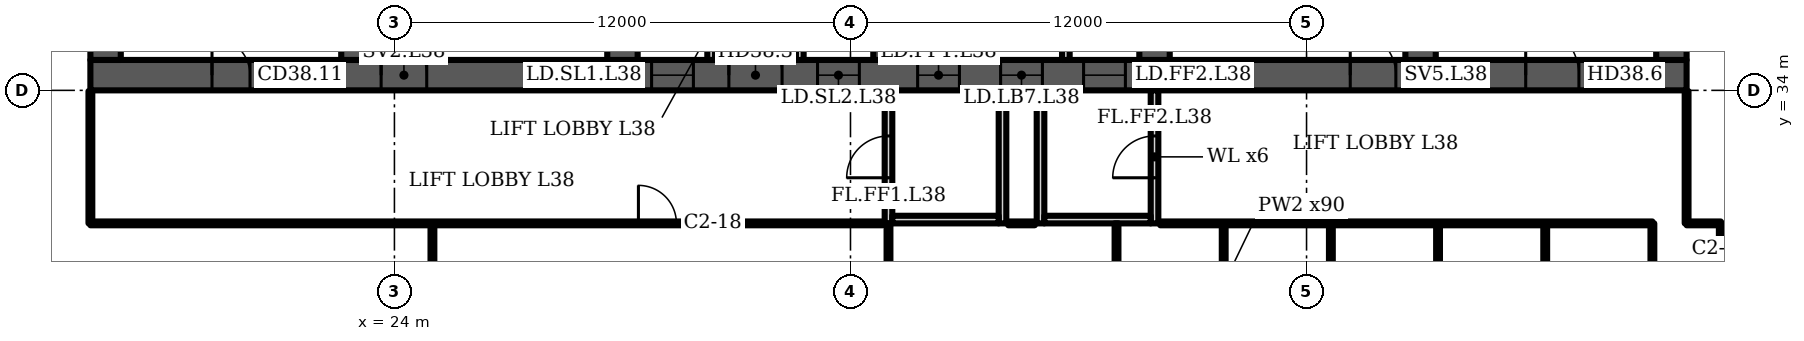
"""IFC4 building model, lengths in metres.
Left out: names, types, materials, properties, quantities, classifications, styles, units other than length and angle.
Written with IfcOpenShell. Run it as: python <this file> out.ifc"""

import sys

from ifc_helpers import new_model, si_unit, direction, frame, frame_2d, origin, place, context, subcontext, project, spatial, polyline, rectangle, outline, extrude, element, fill, save


model = new_model("IFC4")
c1 = context("Model", 3, precision=1e-05, world=origin(), true_north=direction((0.0, 1.0)))
c2 = subcontext(c1, "Body", "Model", "MODEL_VIEW")
j1 = project(units=[si_unit("LENGTHUNIT", "METRE"), si_unit("PLANEANGLEUNIT", "RADIAN")], contexts=[c1])
p1 = place(None, origin())
s1 = spatial("IfcSite", under=j1, at=p1, CompositionType="ELEMENT")
p2 = place(p1, origin())
s2 = spatial("IfcBuilding", under=s1, at=p2, CompositionType="ELEMENT")
p3 = place(p2, frame((0.0, 0.0, 159.1)))
s3 = spatial("IfcBuildingStorey", under=s2, at=p3, CompositionType="ELEMENT", Elevation=159.1)
p4 = place(p3, frame((16.0, 34.4, 0.0), z_axis=(0.0, 0.0, 1.0), x_axis=(1.0, 0.0, 0.0)))
e1 = element("IfcWall", 1, at=p4, inside=s3, PredefinedType="SHEAR", context=c2, shape_type="SweptSolid", body=[
    extrude(rectangle(XDim=42.0, YDim=0.8, at=frame_2d((21.0, 0.0))), origin(), (0.0, 0.0, 1.0), 3.6),
])
p5 = place(p4, frame((3.2, 0.0, 0.0)))
e2 = element("IfcOpeningElement", 2, at=p5, cuts=e1, PredefinedType="OPENING", context=c2, shape_type="SweptSolid", body=[
    extrude(rectangle(XDim=1.0, YDim=2.1, at=frame_2d((0.5, 1.05))), frame((0.0, 0.41, 0.0), z_axis=(0.0, -1.0, 0.0), x_axis=(1.0, 0.0, 0.0)), (0.0, 0.0, 1.0), 0.82),
])
p6 = place(p4, frame((7.65, 0.0, 0.0)))
e3 = element("IfcOpeningElement", 3, at=p6, cuts=e1, PredefinedType="OPENING", context=c2, shape_type="SweptSolid", body=[
    extrude(rectangle(XDim=1.2, YDim=2.1, at=frame_2d((0.6, 1.05))), frame((0.0, 0.41, 0.0), z_axis=(0.0, -1.0, 0.0), x_axis=(1.0, 0.0, 0.0)), (0.0, 0.0, 1.0), 0.82),
])
p7 = place(p4, frame((14.767, 0.0, 0.0)))
e4 = element("IfcOpeningElement", 4, at=p7, cuts=e1, PredefinedType="OPENING", context=c2, shape_type="SweptSolid", body=[
    extrude(rectangle(XDim=1.1, YDim=2.1, at=frame_2d((0.55, 1.05))), frame((0.0, 0.41, 0.0), z_axis=(0.0, -1.0, 0.0), x_axis=(1.0, 0.0, 0.0)), (0.0, 0.0, 1.0), 0.82),
])
p8 = place(p4, frame((19.133, 0.0, 0.0)))
e5 = element("IfcOpeningElement", 5, at=p8, cuts=e1, PredefinedType="OPENING", context=c2, shape_type="SweptSolid", body=[
    extrude(rectangle(XDim=1.1, YDim=2.1, at=frame_2d((0.55, 1.05))), frame((0.0, 0.41, 0.0), z_axis=(0.0, -1.0, 0.0), x_axis=(1.0, 0.0, 0.0)), (0.0, 0.0, 1.0), 0.82),
])
p9 = place(p4, frame((16.8, 0.0, 0.0)))
e6 = element("IfcOpeningElement", 6, at=p9, cuts=e1, PredefinedType="OPENING", context=c2, shape_type="SweptSolid", body=[
    extrude(rectangle(XDim=1.4, YDim=2.1, at=frame_2d((0.7, 1.05))), frame((0.0, 0.41, 0.0), z_axis=(0.0, -1.0, 0.0), x_axis=(1.0, 0.0, 0.0)), (0.0, 0.0, 1.0), 0.82),
])
p10 = place(p4, frame((21.767, 0.0, 0.0)))
e7 = element("IfcOpeningElement", 7, at=p10, cuts=e1, PredefinedType="OPENING", context=c2, shape_type="SweptSolid", body=[
    extrude(rectangle(XDim=1.1, YDim=2.1, at=frame_2d((0.55, 1.05))), frame((0.0, 0.41, 0.0), z_axis=(0.0, -1.0, 0.0), x_axis=(1.0, 0.0, 0.0)), (0.0, 0.0, 1.0), 0.82),
])
p11 = place(p4, frame((23.95, 0.0, 0.0)))
e8 = element("IfcOpeningElement", 8, at=p11, cuts=e1, PredefinedType="OPENING", context=c2, shape_type="SweptSolid", body=[
    extrude(rectangle(XDim=1.1, YDim=2.1, at=frame_2d((0.55, 1.05))), frame((0.0, 0.41, 0.0), z_axis=(0.0, -1.0, 0.0), x_axis=(1.0, 0.0, 0.0)), (0.0, 0.0, 1.0), 0.82),
])
p12 = place(p4, frame((26.133, 0.0, 0.0)))
e9 = element("IfcOpeningElement", 9, at=p12, cuts=e1, PredefinedType="OPENING", context=c2, shape_type="SweptSolid", body=[
    extrude(rectangle(XDim=1.1, YDim=2.1, at=frame_2d((0.55, 1.05))), frame((0.0, 0.41, 0.0), z_axis=(0.0, -1.0, 0.0), x_axis=(1.0, 0.0, 0.0)), (0.0, 0.0, 1.0), 0.82),
])
p13 = place(p4, frame((33.15, 0.0, 0.0)))
e10 = element("IfcOpeningElement", 10, at=p13, cuts=e1, PredefinedType="OPENING", context=c2, shape_type="SweptSolid", body=[
    extrude(rectangle(XDim=1.2, YDim=2.1, at=frame_2d((0.6, 1.05))), frame((0.0, 0.41, 0.0), z_axis=(0.0, -1.0, 0.0), x_axis=(1.0, 0.0, 0.0)), (0.0, 0.0, 1.0), 0.82),
])
p14 = place(p4, frame((37.767, 0.0, 0.0)))
e11 = element("IfcOpeningElement", 11, at=p14, cuts=e1, PredefinedType="OPENING", context=c2, shape_type="SweptSolid", body=[
    extrude(rectangle(XDim=1.4, YDim=2.1, at=frame_2d((0.7, 1.05))), frame((0.0, 0.41, 0.0), z_axis=(0.0, -1.0, 0.0), x_axis=(1.0, 0.0, 0.0)), (0.0, 0.0, 1.0), 0.82),
])
p15 = place(p3, frame((16.4, 34.8, 0.0), z_axis=(0.0, 0.0, 1.0), x_axis=(0.0, 1.0, 0.0)))
e12 = element("IfcWall", 12, at=p15, inside=s3, PredefinedType="SHEAR", context=c2, shape_type="SweptSolid", body=[
    extrude(rectangle(XDim=13.184, YDim=0.8, at=frame_2d((6.592, 0.0))), origin(), (0.0, 0.0, 1.0), 3.6),
])
p16 = place(p3, frame((23.0, 34.8, 0.0), z_axis=(0.0, 0.0, 1.0), x_axis=(0.0, 1.0, 0.0)))
e13 = element("IfcWall", 13, at=p16, inside=s3, PredefinedType="SHEAR", context=c2, shape_type="SweptSolid", body=[
    extrude(rectangle(XDim=13.762, YDim=0.8, at=frame_2d((6.881, 0.0))), origin(), (0.0, 0.0, 1.0), 3.6),
])
p17 = place(p16, frame((2.55, 0.0, 0.0)))
e14 = element("IfcOpeningElement", 14, at=p17, cuts=e13, PredefinedType="OPENING", context=c2, shape_type="SweptSolid", body=[
    extrude(rectangle(XDim=1.1, YDim=2.1, at=frame_2d((0.55, 1.05))), frame((0.0, 0.41, 0.0), z_axis=(0.0, -1.0, 0.0), x_axis=(1.0, 0.0, 0.0)), (0.0, 0.0, 1.0), 0.82),
])
p18 = place(p16, frame((10.0, 0.0, 0.0)))
e15 = element("IfcOpeningElement", 15, at=p18, cuts=e13, PredefinedType="OPENING", context=c2, shape_type="SweptSolid", body=[
    extrude(rectangle(XDim=1.0, YDim=2.1, at=frame_2d((0.5, 1.05))), frame((0.0, 0.41, 0.0), z_axis=(0.0, -1.0, 0.0), x_axis=(1.0, 0.0, 0.0)), (0.0, 0.0, 1.0), 0.82),
])
p19 = place(p3, frame((30.0, 34.8, 0.0), z_axis=(0.0, 0.0, 1.0), x_axis=(0.0, 1.0, 0.0)))
e16 = element("IfcWall", 16, at=p19, inside=s3, PredefinedType="SHEAR", context=c2, shape_type="SweptSolid", body=[
    extrude(rectangle(XDim=14.374, YDim=0.8, at=frame_2d((7.187, 0.0))), origin(), (0.0, 0.0, 1.0), 3.6),
])
p20 = place(p19, frame((3.6, 0.0, 0.0)))
e17 = element("IfcOpeningElement", 17, at=p20, cuts=e16, PredefinedType="OPENING", context=c2, shape_type="SweptSolid", body=[
    extrude(rectangle(XDim=1.1, YDim=2.1, at=frame_2d((0.55, 1.05))), frame((0.0, 0.41, 0.0), z_axis=(0.0, -1.0, 0.0), x_axis=(1.0, 0.0, 0.0)), (0.0, 0.0, 1.0), 0.82),
])
p21 = place(p3, frame((37.0, 34.8, 0.0), z_axis=(0.0, 0.0, 1.0), x_axis=(0.0, 1.0, 0.0)))
e18 = element("IfcWall", 18, at=p21, inside=s3, PredefinedType="SHEAR", context=c2, shape_type="SweptSolid", body=[
    extrude(rectangle(XDim=14.987, YDim=0.8, at=frame_2d((7.493, 0.0))), origin(), (0.0, 0.0, 1.0), 3.6),
])
p22 = place(p21, frame((11.312, 0.0, 0.0)))
e19 = element("IfcOpeningElement", 19, at=p22, cuts=e18, PredefinedType="OPENING", context=c2, shape_type="SweptSolid", body=[
    extrude(rectangle(XDim=1.0, YDim=2.1, at=frame_2d((0.5, 1.05))), frame((0.0, 0.41, 0.0), z_axis=(0.0, -1.0, 0.0), x_axis=(1.0, 0.0, 0.0)), (0.0, 0.0, 1.0), 0.82),
])
p23 = place(p21, frame((3.6, 0.0, 0.0)))
e20 = element("IfcOpeningElement", 20, at=p23, cuts=e18, PredefinedType="OPENING", context=c2, shape_type="SweptSolid", body=[
    extrude(rectangle(XDim=1.1, YDim=2.1, at=frame_2d((0.55, 1.05))), frame((0.0, 0.41, 0.0), z_axis=(0.0, -1.0, 0.0), x_axis=(1.0, 0.0, 0.0)), (0.0, 0.0, 1.0), 0.82),
])
p24 = place(p3, frame((44.0, 34.8, 0.0), z_axis=(0.0, 0.0, 1.0), x_axis=(0.0, 1.0, 0.0)))
e21 = element("IfcWall", 21, at=p24, inside=s3, PredefinedType="SHEAR", context=c2, shape_type="SweptSolid", body=[
    extrude(rectangle(XDim=14.374, YDim=0.8, at=frame_2d((7.187, 0.0))), origin(), (0.0, 0.0, 1.0), 3.6),
])
p25 = place(p24, frame((11.312, 0.0, 0.0)))
e22 = element("IfcOpeningElement", 22, at=p25, cuts=e21, PredefinedType="OPENING", context=c2, shape_type="SweptSolid", body=[
    extrude(rectangle(XDim=1.0, YDim=2.1, at=frame_2d((0.5, 1.05))), frame((0.0, 0.41, 0.0), z_axis=(0.0, -1.0, 0.0), x_axis=(1.0, 0.0, 0.0)), (0.0, 0.0, 1.0), 0.82),
])
p26 = place(p24, frame((3.6, 0.0, 0.0)))
e23 = element("IfcOpeningElement", 23, at=p26, cuts=e21, PredefinedType="OPENING", context=c2, shape_type="SweptSolid", body=[
    extrude(rectangle(XDim=1.1, YDim=2.1, at=frame_2d((0.55, 1.05))), frame((0.0, 0.41, 0.0), z_axis=(0.0, -1.0, 0.0), x_axis=(1.0, 0.0, 0.0)), (0.0, 0.0, 1.0), 0.82),
])
p27 = place(p3, frame((51.0, 34.8, 0.0), z_axis=(0.0, 0.0, 1.0), x_axis=(0.0, 1.0, 0.0)))
e24 = element("IfcWall", 24, at=p27, inside=s3, PredefinedType="SHEAR", context=c2, shape_type="SweptSolid", body=[
    extrude(rectangle(XDim=13.762, YDim=0.8, at=frame_2d((6.881, 0.0))), origin(), (0.0, 0.0, 1.0), 3.6),
])
p28 = place(p27, frame((3.6, 0.0, 0.0)))
e25 = element("IfcOpeningElement", 25, at=p28, cuts=e24, PredefinedType="OPENING", context=c2, shape_type="SweptSolid", body=[
    extrude(rectangle(XDim=1.1, YDim=2.1, at=frame_2d((0.55, 1.05))), frame((0.0, 0.41, 0.0), z_axis=(0.0, -1.0, 0.0), x_axis=(1.0, 0.0, 0.0)), (0.0, 0.0, 1.0), 0.82),
])
p29 = place(p3, frame((57.6, 34.8, 0.0), z_axis=(0.0, 0.0, 1.0), x_axis=(0.0, 1.0, 0.0)))
e26 = element("IfcWall", 26, at=p29, inside=s3, PredefinedType="SHEAR", context=c2, shape_type="SweptSolid", body=[
    extrude(rectangle(XDim=13.184, YDim=0.8, at=frame_2d((6.592, 0.0))), origin(), (0.0, 0.0, 1.0), 3.6),
])
p30 = place(p3, frame((0.0, 0.0, -0.0)))
e27 = element("IfcWall", 27, at=p30, inside=s3, PredefinedType="PARTITIONING", context=c2, shape_type="SweptSolid", body=[
    extrude(outline(polyline([(32.233, 37.65), (30.4, 37.65), (30.4, 37.85), (32.233, 37.85), (32.433, 37.85), (32.433, 34.8), (32.233, 34.8), (32.233, 37.65)])), origin(), (0.0, 0.0, 1.0), 3.2),
])
p31 = place(p3, frame((0.0, 0.0, -0.0)))
e28 = element("IfcWall", 28, at=p31, inside=s3, PredefinedType="PARTITIONING", context=c2, shape_type="SweptSolid", body=[
    extrude(outline(polyline([(34.567, 37.85), (34.767, 37.85), (36.6, 37.85), (36.6, 37.65), (34.767, 37.65), (34.767, 34.8), (34.567, 34.8), (34.567, 37.85)])), origin(), (0.0, 0.0, 1.0), 3.2),
])
p32 = place(p3, frame((0.0, 0.0, -0.0)))
e29 = element("IfcWall", 29, at=p32, inside=s3, PredefinedType="PARTITIONING", context=c2, shape_type="SweptSolid", body=[
    extrude(outline(polyline([(41.567, 37.1), (39.433, 37.1), (39.433, 34.8), (39.233, 34.8), (39.233, 37.65), (37.4, 37.65), (37.4, 37.85), (39.233, 37.85), (39.433, 37.85), (39.433, 37.3), (41.567, 37.3), (41.567, 37.55), (41.767, 37.55), (43.6, 37.55), (43.6, 37.35), (41.767, 37.35), (41.767, 34.8), (41.567, 34.8), (41.567, 37.1)])), origin(), (0.0, 0.0, 1.0), 3.2),
])
p33 = place(p3, frame((37.0, 30.5, 0.0), z_axis=(0.0, 0.0, 1.0), x_axis=(0.0, 1.0, 0.0)))
e30 = element("IfcWall", 30, at=p33, inside=s3, PredefinedType="PARTITIONING", context=c2, shape_type="SweptSolid", body=[
    extrude(rectangle(XDim=3.5, YDim=0.2, at=frame_2d((1.75, 0.0))), origin(), (0.0, 0.0, 1.0), 3.2),
])
p34 = place(p33, frame((1.2, 0.0, 0.0)))
e31 = element("IfcOpeningElement", 31, at=p34, cuts=e30, PredefinedType="OPENING", context=c2, shape_type="SweptSolid", body=[
    extrude(rectangle(XDim=1.1, YDim=2.1, at=frame_2d((0.55, 1.05))), frame((0.0, 0.11, 0.0), z_axis=(0.0, -1.0, 0.0), x_axis=(1.0, 0.0, 0.0)), (0.0, 0.0, 1.0), 0.22),
])
p35 = place(p3, frame((40.0, 30.5, 0.0), z_axis=(0.0, 0.0, 1.0), x_axis=(0.0, 1.0, 0.0)))
e32 = element("IfcWall", 32, at=p35, inside=s3, PredefinedType="PARTITIONING", context=c2, shape_type="SweptSolid", body=[
    extrude(rectangle(XDim=3.5, YDim=0.2, at=frame_2d((1.75, 0.0))), origin(), (0.0, 0.0, 1.0), 3.2),
])
p36 = place(p3, frame((37.1, 30.6, 0.0), z_axis=(0.0, 0.0, 1.0), x_axis=(1.0, 0.0, 0.0)))
e33 = element("IfcWall", 33, at=p36, inside=s3, PredefinedType="PARTITIONING", context=c2, shape_type="SweptSolid", body=[
    extrude(rectangle(XDim=2.8, YDim=0.2, at=frame_2d((1.4, 0.0))), origin(), (0.0, 0.0, 1.0), 3.2),
])
p37 = place(p3, frame((41.0, 30.5, 0.0), z_axis=(0.0, 0.0, 1.0), x_axis=(0.0, 1.0, 0.0)))
e34 = element("IfcWall", 34, at=p37, inside=s3, PredefinedType="PARTITIONING", context=c2, shape_type="SweptSolid", body=[
    extrude(rectangle(XDim=3.5, YDim=0.2, at=frame_2d((1.75, 0.0))), origin(), (0.0, 0.0, 1.0), 3.2),
])
p38 = place(p3, frame((44.0, 30.5, 0.0), z_axis=(0.0, 0.0, 1.0), x_axis=(0.0, 1.0, 0.0)))
e35 = element("IfcWall", 35, at=p38, inside=s3, PredefinedType="PARTITIONING", context=c2, shape_type="SweptSolid", body=[
    extrude(rectangle(XDim=3.5, YDim=0.2, at=frame_2d((1.75, 0.0))), origin(), (0.0, 0.0, 1.0), 3.2),
])
p39 = place(p38, frame((1.2, 0.0, 0.0)))
e36 = element("IfcOpeningElement", 36, at=p39, cuts=e35, PredefinedType="OPENING", context=c2, shape_type="SweptSolid", body=[
    extrude(rectangle(XDim=1.1, YDim=2.1, at=frame_2d((0.55, 1.05))), frame((0.0, 0.11, 0.0), z_axis=(0.0, -1.0, 0.0), x_axis=(1.0, 0.0, 0.0)), (0.0, 0.0, 1.0), 0.22),
])
p40 = place(p3, frame((41.1, 30.6, 0.0), z_axis=(0.0, 0.0, 1.0), x_axis=(1.0, 0.0, 0.0)))
e37 = element("IfcWall", 37, at=p40, inside=s3, PredefinedType="PARTITIONING", context=c2, shape_type="SweptSolid", body=[
    extrude(rectangle(XDim=2.8, YDim=0.2, at=frame_2d((1.4, 0.0))), origin(), (0.0, 0.0, 1.0), 3.2),
])
p41 = place(p3, frame((16.0, 30.5, 0.0), z_axis=(0.0, 0.0, 1.0), x_axis=(0.0, 1.0, 0.0)))
e38 = element("IfcWall", 38, at=p41, inside=s3, PredefinedType="PARTITIONING", context=c2, shape_type="SweptSolid", body=[
    extrude(rectangle(XDim=3.48, YDim=0.1, at=frame_2d((1.74, 0.0))), origin(), (0.0, 0.0, 1.0), 3.2),
])
p42 = place(p3, frame((16.0, 30.5, 0.0), z_axis=(0.0, 0.0, 1.0), x_axis=(1.0, 0.0, 0.0)))
e39 = element("IfcWall", 39, at=p42, inside=s3, PredefinedType="PARTITIONING", context=c2, shape_type="SweptSolid", body=[
    extrude(rectangle(XDim=20.85, YDim=0.1, at=frame_2d((10.425, 0.0))), origin(), (0.0, 0.0, 1.0), 3.2),
])
p43 = place(p42, frame((14.42, 0.0, 0.0)))
e40 = element("IfcOpeningElement", 40, at=p43, cuts=e39, PredefinedType="OPENING", context=c2, shape_type="SweptSolid", body=[
    extrude(rectangle(XDim=1.0, YDim=2.1, at=frame_2d((0.5, 1.05))), frame((0.0, 0.06, 0.0), z_axis=(0.0, -1.0, 0.0), x_axis=(1.0, 0.0, 0.0)), (0.0, 0.0, 1.0), 0.12),
])
for number, where, z_axis, x_axis in (
    (41, (25.0, 27.3, 0.0), (0.0, 0.0, 1.0), (0.0, 1.0, 0.0)),
    (42, (37.0, 27.3, 0.0), (0.0, 0.0, 1.0), (0.0, 1.0, 0.0)),
    (43, (43.0, 27.3, 0.0), (0.0, 0.0, 1.0), (0.0, 1.0, 0.0)),
    (44, (45.82, 27.3, 0.0), (0.0, 0.0, 1.0), (0.0, 1.0, 0.0)),
    (45, (48.64, 27.3, 0.0), (0.0, 0.0, 1.0), (0.0, 1.0, 0.0)),
    (46, (51.46, 27.3, 0.0), (0.0, 0.0, 1.0), (0.0, 1.0, 0.0)),
    (47, (54.28, 27.3, 0.0), (0.0, 0.0, 1.0), (0.0, 1.0, 0.0)),
    (48, (57.1, 27.3, 0.0), (0.0, 0.0, 1.0), (0.0, 1.0, 0.0)),
):
    element("IfcWall", number, at=place(p3, frame(where, z_axis=z_axis, x_axis=x_axis)), inside=s3, PredefinedType="PARTITIONING", context=c2, shape_type="SweptSolid", body=[
        extrude(rectangle(XDim=3.2, YDim=0.1, at=frame_2d((1.6, 0.0))), origin(), (0.0, 0.0, 1.0), 3.2),
    ])
p44 = place(p3, frame((58.0, 30.5, 0.0), z_axis=(0.0, 0.0, 1.0), x_axis=(0.0, 1.0, 0.0)))
e49 = element("IfcWall", 49, at=p44, inside=s3, PredefinedType="PARTITIONING", context=c2, shape_type="SweptSolid", body=[
    extrude(rectangle(XDim=3.48, YDim=0.1, at=frame_2d((1.74, 0.0))), origin(), (0.0, 0.0, 1.0), 3.2),
])
p45 = place(p3, frame((58.0, 30.5, 0.0), z_axis=(0.0, 0.0, 1.0), x_axis=(1.0, 0.0, 0.0)))
e50 = element("IfcWall", 50, at=p45, inside=s3, PredefinedType="PARTITIONING", context=c2, shape_type="SweptSolid", body=[
    extrude(rectangle(XDim=0.9, YDim=0.1, at=frame_2d((0.45, 0.0))), origin(), (0.0, 0.0, 1.0), 3.2),
])
p46 = place(p3, frame((58.9, 27.3, 0.0), z_axis=(0.0, 0.0, 1.0), x_axis=(0.0, 1.0, 0.0)))
e51 = element("IfcWall", 51, at=p46, inside=s3, PredefinedType="PARTITIONING", context=c2, shape_type="SweptSolid", body=[
    extrude(rectangle(XDim=3.2, YDim=0.1, at=frame_2d((1.6, 0.0))), origin(), (0.0, 0.0, 1.0), 3.2),
])
p47 = place(p46, frame((1.045, 0.0, 0.0)))
e52 = element("IfcOpeningElement", 52, at=p47, cuts=e51, PredefinedType="OPENING", context=c2, shape_type="SweptSolid", body=[
    extrude(rectangle(XDim=1.0, YDim=2.1, at=frame_2d((0.5, 1.05))), frame((0.0, 0.06, 0.0), z_axis=(0.0, -1.0, 0.0), x_axis=(1.0, 0.0, 0.0)), (0.0, 0.0, 1.0), 0.12),
])
p48 = place(p3, frame((40.15, 30.5, 0.0), z_axis=(0.0, 0.0, 1.0), x_axis=(1.0, 0.0, 0.0)))
e53 = element("IfcWall", 53, at=p48, inside=s3, PredefinedType="PARTITIONING", context=c2, shape_type="SweptSolid", body=[
    extrude(rectangle(XDim=0.7, YDim=0.1, at=frame_2d((0.35, 0.0))), origin(), (0.0, 0.0, 1.0), 3.2),
])
p49 = place(p3, frame((44.15, 30.5, 0.0), z_axis=(0.0, 0.0, 1.0), x_axis=(1.0, 0.0, 0.0)))
e54 = element("IfcWall", 54, at=p49, inside=s3, PredefinedType="PARTITIONING", context=c2, shape_type="SweptSolid", body=[
    extrude(rectangle(XDim=12.95, YDim=0.1, at=frame_2d((6.475, 0.0))), origin(), (0.0, 0.0, 1.0), 3.2),
])
p50 = place(p5, origin())
e55 = element("IfcDoor", 55, at=p50, inside=s3, OperationType="SINGLE_SWING_LEFT", PredefinedType="DOOR", context=c2, shape_type="SweptSolid", body=[
    extrude(rectangle(XDim=1.0, YDim=2.1, at=frame_2d((0.5, 1.05))), frame((0.0, 0.4, 0.0), z_axis=(0.0, -1.0, 0.0), x_axis=(1.0, 0.0, 0.0)), (0.0, 0.0, 1.0), 0.8),
])
fill(e2, e55)
p51 = place(p6, origin())
e56 = element("IfcDoor", 56, at=p51, inside=s3, OperationType="SINGLE_SWING_LEFT", PredefinedType="DOOR", context=c2, shape_type="SweptSolid", body=[
    extrude(rectangle(XDim=1.2, YDim=2.1, at=frame_2d((0.6, 1.05))), frame((0.0, 0.025, 0.0), z_axis=(0.0, -1.0, 0.0), x_axis=(1.0, 0.0, 0.0)), (0.0, 0.0, 1.0), 0.05),
])
fill(e3, e56)
p52 = place(p7, origin())
e57 = element("IfcDoor", 57, at=p52, inside=s3, OperationType="DOUBLE_DOOR_SLIDING", PredefinedType="DOOR", context=c2, shape_type="SweptSolid", body=[
    extrude(rectangle(XDim=1.1, YDim=2.1, at=frame_2d((0.55, 1.05))), frame((0.0, 0.025, 0.0), z_axis=(0.0, -1.0, 0.0), x_axis=(1.0, 0.0, 0.0)), (0.0, 0.0, 1.0), 0.05),
])
fill(e4, e57)
p53 = place(p8, origin())
e58 = element("IfcDoor", 58, at=p53, inside=s3, OperationType="DOUBLE_DOOR_SLIDING", PredefinedType="DOOR", context=c2, shape_type="SweptSolid", body=[
    extrude(rectangle(XDim=1.1, YDim=2.1, at=frame_2d((0.55, 1.05))), frame((0.0, 0.025, 0.0), z_axis=(0.0, -1.0, 0.0), x_axis=(1.0, 0.0, 0.0)), (0.0, 0.0, 1.0), 0.05),
])
fill(e5, e58)
p54 = place(p9, origin())
e59 = element("IfcDoor", 59, at=p54, inside=s3, OperationType="DOUBLE_DOOR_SINGLE_SWING", PredefinedType="DOOR", context=c2, shape_type="SweptSolid", body=[
    extrude(rectangle(XDim=1.4, YDim=2.1, at=frame_2d((0.7, 1.05))), frame((0.0, 0.025, 0.0), z_axis=(0.0, -1.0, 0.0), x_axis=(1.0, 0.0, 0.0)), (0.0, 0.0, 1.0), 0.05),
])
fill(e6, e59)
p55 = place(p10, origin())
e60 = element("IfcDoor", 60, at=p55, inside=s3, OperationType="DOUBLE_DOOR_SLIDING", PredefinedType="DOOR", context=c2, shape_type="SweptSolid", body=[
    extrude(rectangle(XDim=1.1, YDim=2.1, at=frame_2d((0.55, 1.05))), frame((0.0, 0.025, 0.0), z_axis=(0.0, -1.0, 0.0), x_axis=(1.0, 0.0, 0.0)), (0.0, 0.0, 1.0), 0.05),
])
fill(e7, e60)
p56 = place(p11, origin())
e61 = element("IfcDoor", 61, at=p56, inside=s3, OperationType="DOUBLE_DOOR_SLIDING", PredefinedType="DOOR", context=c2, shape_type="SweptSolid", body=[
    extrude(rectangle(XDim=1.1, YDim=2.1, at=frame_2d((0.55, 1.05))), frame((0.0, 0.025, 0.0), z_axis=(0.0, -1.0, 0.0), x_axis=(1.0, 0.0, 0.0)), (0.0, 0.0, 1.0), 0.05),
])
fill(e8, e61)
p57 = place(p12, origin())
e62 = element("IfcDoor", 62, at=p57, inside=s3, OperationType="DOUBLE_DOOR_SLIDING", PredefinedType="DOOR", context=c2, shape_type="SweptSolid", body=[
    extrude(rectangle(XDim=1.1, YDim=2.1, at=frame_2d((0.55, 1.05))), frame((0.0, 0.025, 0.0), z_axis=(0.0, -1.0, 0.0), x_axis=(1.0, 0.0, 0.0)), (0.0, 0.0, 1.0), 0.05),
])
fill(e9, e62)
p58 = place(p13, origin())
e63 = element("IfcDoor", 63, at=p58, inside=s3, OperationType="SINGLE_SWING_LEFT", PredefinedType="DOOR", context=c2, shape_type="SweptSolid", body=[
    extrude(rectangle(XDim=1.2, YDim=2.1, at=frame_2d((0.6, 1.05))), frame((0.0, 0.025, 0.0), z_axis=(0.0, -1.0, 0.0), x_axis=(1.0, 0.0, 0.0)), (0.0, 0.0, 1.0), 0.05),
])
fill(e10, e63)
p59 = place(p14, origin())
e64 = element("IfcDoor", 64, at=p59, inside=s3, OperationType="DOUBLE_DOOR_SINGLE_SWING", PredefinedType="DOOR", context=c2, shape_type="SweptSolid", body=[
    extrude(rectangle(XDim=1.4, YDim=2.1, at=frame_2d((0.7, 1.05))), frame((0.0, 0.025, 0.0), z_axis=(0.0, -1.0, 0.0), x_axis=(1.0, 0.0, 0.0)), (0.0, 0.0, 1.0), 0.05),
])
fill(e11, e64)
p60 = place(p34, origin())
e65 = element("IfcDoor", 65, at=p60, inside=s3, OperationType="SINGLE_SWING_LEFT", PredefinedType="DOOR", context=c2, shape_type="SweptSolid", body=[
    extrude(rectangle(XDim=1.1, YDim=2.1, at=frame_2d((0.55, 1.05))), frame((0.0, 0.025, 0.0), z_axis=(0.0, -1.0, 0.0), x_axis=(1.0, 0.0, 0.0)), (0.0, 0.0, 1.0), 0.05),
])
fill(e31, e65)
p61 = place(p39, origin())
e66 = element("IfcDoor", 66, at=p61, inside=s3, OperationType="SINGLE_SWING_LEFT", PredefinedType="DOOR", context=c2, shape_type="SweptSolid", body=[
    extrude(rectangle(XDim=1.1, YDim=2.1, at=frame_2d((0.55, 1.05))), frame((0.0, 0.025, 0.0), z_axis=(0.0, -1.0, 0.0), x_axis=(1.0, 0.0, 0.0)), (0.0, 0.0, 1.0), 0.05),
])
fill(e36, e66)
p62 = place(p43, origin())
e67 = element("IfcDoor", 67, at=p62, inside=s3, OperationType="SINGLE_SWING_LEFT", PredefinedType="DOOR", context=c2, shape_type="SweptSolid", body=[
    extrude(rectangle(XDim=1.0, YDim=2.1, at=frame_2d((0.5, 1.05))), frame((0.0, 0.025, 0.0), z_axis=(0.0, -1.0, 0.0), x_axis=(1.0, 0.0, 0.0)), (0.0, 0.0, 1.0), 0.05),
])
fill(e40, e67)
save(model, sys.argv[1])
